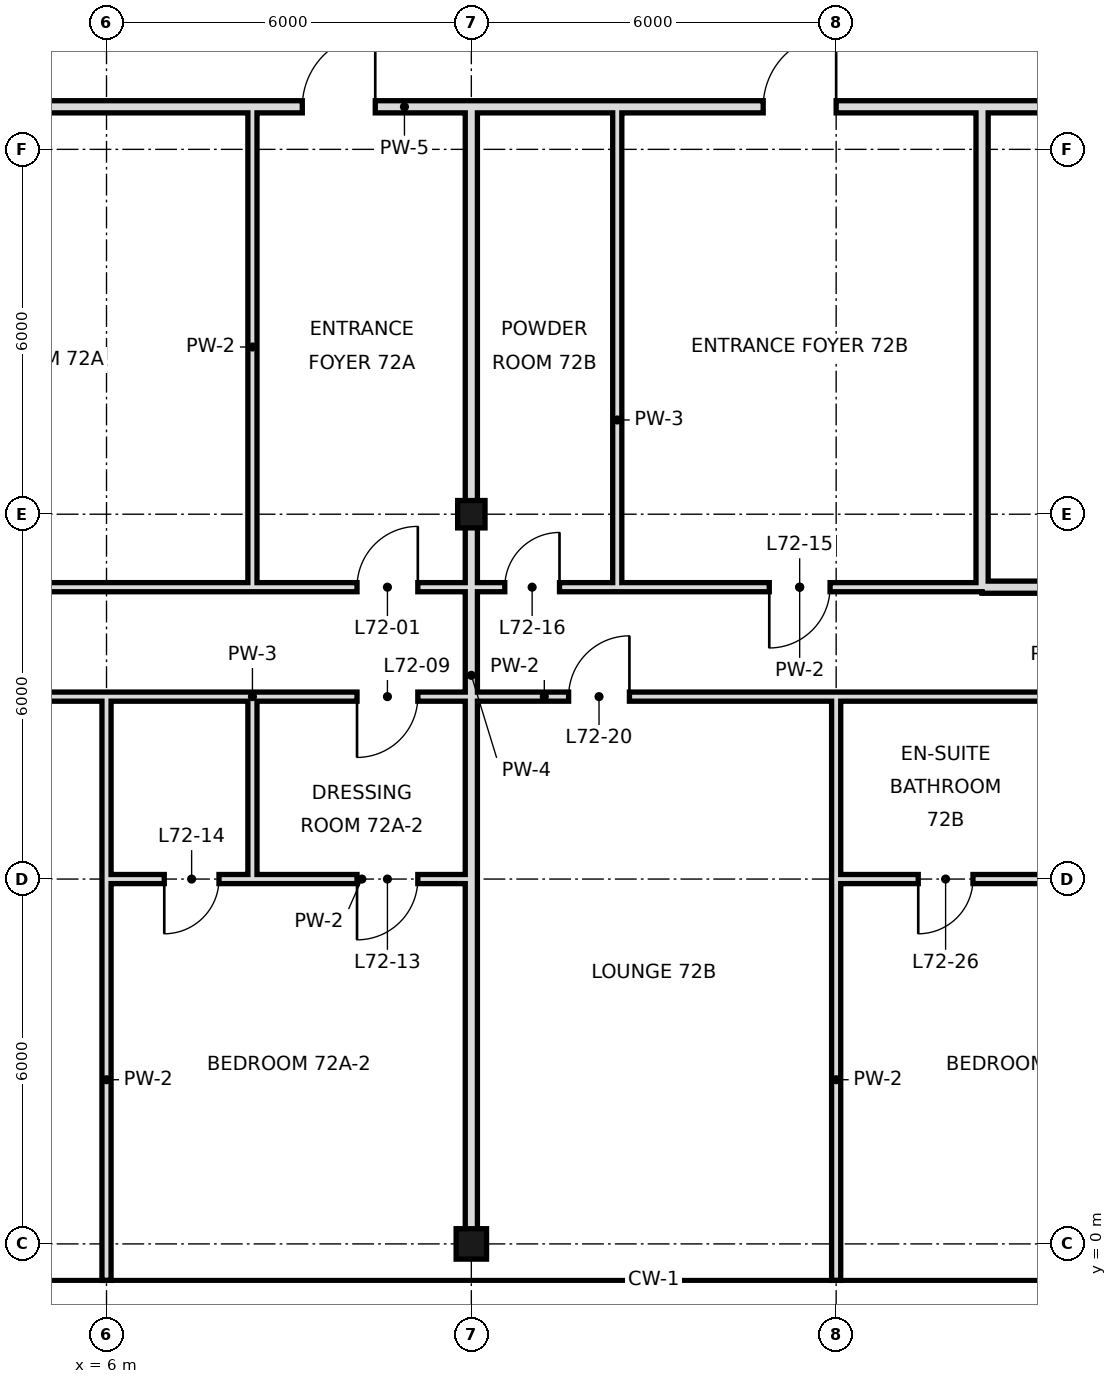
"""IFC4 building model, lengths in metres.
Left out: names, types, materials, properties, quantities, classifications, styles, units other than length and angle.
Written with IfcOpenShell. Run it as: python <this file> out.ifc"""

import sys

from ifc_helpers import new_model, si_unit, direction, frame, frame_2d, origin, origin_2d, place, context, subcontext, project, spatial, rectangle, hollow_rectangle, extrude, element, fill, save


model = new_model("IFC4")
c1 = context("Model", 3, precision=1e-05, world=origin(), true_north=direction((0.0, 1.0)))
c2 = subcontext(c1, "Body", "Model", "MODEL_VIEW")
j1 = project(units=[si_unit("LENGTHUNIT", "METRE"), si_unit("PLANEANGLEUNIT", "RADIAN")], contexts=[c1])
p1 = place(None, origin())
s1 = spatial("IfcSite", under=j1, at=p1, CompositionType="ELEMENT")
p2 = place(p1, origin())
s2 = spatial("IfcBuilding", under=s1, at=p2, CompositionType="ELEMENT")
p3 = place(p2, frame((0.0, 0.0, 305.2)))
s3 = spatial("IfcBuildingStorey", under=s2, at=p3, CompositionType="ELEMENT", Elevation=305.2)
p4 = place(p3, frame((12.0, 0.0, 0.0), z_axis=(0.0, 0.0, 1.0), x_axis=(1.0, 0.0, 0.0)))
e1 = element("IfcColumn", 1, at=p4, inside=s3, PredefinedType="COLUMN", context=c2, shape_type="SweptSolid", body=[
    extrude(hollow_rectangle(XDim=0.5, YDim=0.5, WallThickness=0.025, at=origin_2d()), origin(), (0.0, 0.0, 1.0), 3.6),
])
p5 = place(p3, frame((12.0, 12.0, 0.0), z_axis=(0.0, 0.0, 1.0), x_axis=(1.0, 0.0, 0.0)))
e2 = element("IfcColumn", 2, at=p5, inside=s3, PredefinedType="COLUMN", context=c2, shape_type="SweptSolid", body=[
    extrude(hollow_rectangle(XDim=0.45, YDim=0.45, WallThickness=0.022, at=origin_2d()), origin(), (0.0, 0.0, 1.0), 3.6),
])
p6 = place(p3, frame((12.0, 0.0, 0.0), z_axis=(0.0, 0.0, 1.0), x_axis=(0.0, 1.0, 0.0)))
e3 = element("IfcWall", 3, at=p6, inside=s3, PredefinedType="SOLIDWALL", context=c2, shape_type="SweptSolid", body=[
    extrude(rectangle(XDim=18.7, YDim=0.2, at=frame_2d((9.35, 0.0))), origin(), (0.0, 0.0, 1.0), 2.72),
])
p7 = place(p3, frame((14.4, 10.8, 0.0), z_axis=(0.0, 0.0, 1.0), x_axis=(0.0, 1.0, 0.0)))
e4 = element("IfcWall", 4, at=p7, inside=s3, PredefinedType="PARTITIONING", context=c2, shape_type="SweptSolid", body=[
    extrude(rectangle(XDim=7.9, YDim=0.15, at=frame_2d((3.95, 0.0))), origin(), (0.0, 0.0, 1.0), 3.42),
])
p8 = place(p3, frame((18.0, -0.6, 0.0), z_axis=(0.0, 0.0, 1.0), x_axis=(0.0, 1.0, 0.0)))
e5 = element("IfcWall", 5, at=p8, inside=s3, PredefinedType="PARTITIONING", context=c2, shape_type="SweptSolid", body=[
    extrude(rectangle(XDim=6.6, YDim=0.15, at=frame_2d((3.3, 0.0))), origin(), (0.0, 0.0, 1.0), 2.72),
])
p9 = place(p3, frame((18.0, 6.0, 0.0), z_axis=(0.0, 0.0, 1.0), x_axis=(0.0, 1.0, 0.0)))
e6 = element("IfcWall", 6, at=p9, inside=s3, PredefinedType="PARTITIONING", context=c2, shape_type="SweptSolid", body=[
    extrude(rectangle(XDim=3.0, YDim=0.15, at=frame_2d((1.5, 0.0))), origin(), (0.0, 0.0, 1.0), 2.72),
])
p10 = place(p3, frame((20.4, 10.8, 0.0), z_axis=(0.0, 0.0, 1.0), x_axis=(0.0, 1.0, 0.0)))
e7 = element("IfcWall", 7, at=p10, inside=s3, PredefinedType="SOLIDWALL", context=c2, shape_type="SweptSolid", body=[
    extrude(rectangle(XDim=7.9, YDim=0.2, at=frame_2d((3.95, 0.0))), origin(), (0.0, 0.0, 1.0), 2.72),
])
p11 = place(p3, frame((6.0, -0.6, 0.0), z_axis=(0.0, 0.0, 1.0), x_axis=(0.0, 1.0, 0.0)))
e8 = element("IfcWall", 8, at=p11, inside=s3, PredefinedType="PARTITIONING", context=c2, shape_type="SweptSolid", body=[
    extrude(rectangle(XDim=6.6, YDim=0.15, at=frame_2d((3.3, 0.0))), origin(), (0.0, 0.0, 1.0), 2.72),
])
p12 = place(p3, frame((6.0, 6.0, 0.0), z_axis=(0.0, 0.0, 1.0), x_axis=(0.0, 1.0, 0.0)))
e9 = element("IfcWall", 9, at=p12, inside=s3, PredefinedType="PARTITIONING", context=c2, shape_type="SweptSolid", body=[
    extrude(rectangle(XDim=3.0, YDim=0.15, at=frame_2d((1.5, 0.0))), origin(), (0.0, 0.0, 1.0), 2.72),
])
p13 = place(p3, frame((8.4, 10.8, 0.0), z_axis=(0.0, 0.0, 1.0), x_axis=(0.0, 1.0, 0.0)))
e10 = element("IfcWall", 10, at=p13, inside=s3, PredefinedType="PARTITIONING", context=c2, shape_type="SweptSolid", body=[
    extrude(rectangle(XDim=7.9, YDim=0.15, at=frame_2d((3.95, 0.0))), origin(), (0.0, 0.0, 1.0), 3.42),
])
p14 = place(p3, frame((8.4, 6.0, 0.0), z_axis=(0.0, 0.0, 1.0), x_axis=(0.0, 1.0, 0.0)))
e11 = element("IfcWall", 11, at=p14, inside=s3, PredefinedType="PARTITIONING", context=c2, shape_type="SweptSolid", body=[
    extrude(rectangle(XDim=3.0, YDim=0.15, at=frame_2d((1.5, 0.0))), origin(), (0.0, 0.0, 1.0), 3.42),
])
p15 = place(p3, frame((20.4, 10.8, 0.0), z_axis=(0.0, 0.0, 1.0), x_axis=(1.0, 0.0, 0.0)))
e12 = element("IfcWall", 12, at=p15, inside=s3, PredefinedType="SOLIDWALL", context=c2, shape_type="SweptSolid", body=[
    extrude(rectangle(XDim=4.2, YDim=0.2, at=frame_2d((2.1, 0.0))), origin(), (0.0, 0.0, 1.0), 2.72),
])
p16 = place(p15, frame((2.14, 0.0, 0.0)))
e13 = element("IfcOpeningElement", 13, at=p16, cuts=e12, PredefinedType="OPENING", context=c2, shape_type="SweptSolid", body=[
    extrude(rectangle(XDim=1.0, YDim=2.4, at=frame_2d((0.5, 1.2))), frame((0.0, 0.11, 0.0), z_axis=(0.0, -1.0, 0.0), x_axis=(1.0, 0.0, 0.0)), (0.0, 0.0, 1.0), 0.22),
])
p17 = place(p3, frame((-10.2, 10.8, 0.0), z_axis=(0.0, 0.0, 1.0), x_axis=(1.0, 0.0, 0.0)))
e14 = element("IfcWall", 14, at=p17, inside=s3, PredefinedType="PARTITIONING", context=c2, shape_type="SweptSolid", body=[
    extrude(rectangle(XDim=22.2, YDim=0.15, at=frame_2d((11.1, 0.0))), origin(), (0.0, 0.0, 1.0), 3.42),
])
p18 = place(p17, frame((20.32, 0.0, 0.0)))
e15 = element("IfcOpeningElement", 15, at=p18, cuts=e14, PredefinedType="OPENING", context=c2, shape_type="SweptSolid", body=[
    extrude(rectangle(XDim=1.0, YDim=2.4, at=frame_2d((0.5, 1.2))), frame((0.0, 0.085, 0.0), z_axis=(0.0, -1.0, 0.0), x_axis=(1.0, 0.0, 0.0)), (0.0, 0.0, 1.0), 0.17),
])
p19 = place(p17, frame((3.4, 0.0, 0.0)))
e16 = element("IfcOpeningElement", 16, at=p19, cuts=e14, PredefinedType="OPENING", context=c2, shape_type="SweptSolid", body=[
    extrude(rectangle(XDim=1.0, YDim=2.4, at=frame_2d((0.5, 1.2))), frame((0.0, 0.085, 0.0), z_axis=(0.0, -1.0, 0.0), x_axis=(1.0, 0.0, 0.0)), (0.0, 0.0, 1.0), 0.17),
])
p20 = place(p17, frame((10.84, 0.0, 0.0)))
e17 = element("IfcOpeningElement", 17, at=p20, cuts=e14, PredefinedType="OPENING", context=c2, shape_type="SweptSolid", body=[
    extrude(rectangle(XDim=1.0, YDim=2.4, at=frame_2d((0.5, 1.2))), frame((0.0, 0.085, 0.0), z_axis=(0.0, -1.0, 0.0), x_axis=(1.0, 0.0, 0.0)), (0.0, 0.0, 1.0), 0.17),
])
p21 = place(p3, frame((14.4, 10.8, 0.0), z_axis=(0.0, 0.0, 1.0), x_axis=(1.0, 0.0, 0.0)))
e18 = element("IfcWall", 18, at=p21, inside=s3, PredefinedType="PARTITIONING", context=c2, shape_type="SweptSolid", body=[
    extrude(rectangle(XDim=6.0, YDim=0.15, at=frame_2d((3.0, 0.0))), origin(), (0.0, 0.0, 1.0), 3.42),
])
p22 = place(p21, frame((2.5, 0.0, 0.0)))
e19 = element("IfcOpeningElement", 19, at=p22, cuts=e18, PredefinedType="OPENING", context=c2, shape_type="SweptSolid", body=[
    extrude(rectangle(XDim=1.0, YDim=2.4, at=frame_2d((0.5, 1.2))), frame((0.0, 0.085, 0.0), z_axis=(0.0, -1.0, 0.0), x_axis=(1.0, 0.0, 0.0)), (0.0, 0.0, 1.0), 0.17),
])
p23 = place(p3, frame((12.0, 10.8, 0.0), z_axis=(0.0, 0.0, 1.0), x_axis=(1.0, 0.0, 0.0)))
e20 = element("IfcWall", 20, at=p23, inside=s3, PredefinedType="PARTITIONING", context=c2, shape_type="SweptSolid", body=[
    extrude(rectangle(XDim=2.4, YDim=0.15, at=frame_2d((1.2, 0.0))), origin(), (0.0, 0.0, 1.0), 3.42),
])
p24 = place(p23, frame((0.55, 0.0, 0.0)))
e21 = element("IfcOpeningElement", 21, at=p24, cuts=e20, PredefinedType="OPENING", context=c2, shape_type="SweptSolid", body=[
    extrude(rectangle(XDim=0.9, YDim=2.4, at=frame_2d((0.45, 1.2))), frame((0.0, 0.085, 0.0), z_axis=(0.0, -1.0, 0.0), x_axis=(1.0, 0.0, 0.0)), (0.0, 0.0, 1.0), 0.17),
])
p25 = place(p3, frame((3.1, 18.7, 0.0), z_axis=(0.0, 0.0, 1.0), x_axis=(1.0, 0.0, 0.0)))
e22 = element("IfcWall", 22, at=p25, inside=s3, PredefinedType="SOLIDWALL", context=c2, shape_type="SweptSolid", body=[
    extrude(rectangle(XDim=17.3, YDim=0.2, at=frame_2d((8.65, 0.0))), origin(), (0.0, 0.0, 1.0), 2.72),
])
p26 = place(p25, frame((6.12, 0.0, 0.0)))
e23 = element("IfcOpeningElement", 23, at=p26, cuts=e22, PredefinedType="OPENING", context=c2, shape_type="SweptSolid", body=[
    extrude(rectangle(XDim=1.2, YDim=2.4, at=frame_2d((0.6, 1.2))), frame((0.0, 0.11, 0.0), z_axis=(0.0, -1.0, 0.0), x_axis=(1.0, 0.0, 0.0)), (0.0, 0.0, 1.0), 0.22),
])
p27 = place(p25, frame((13.7, 0.0, 0.0)))
e24 = element("IfcOpeningElement", 24, at=p27, cuts=e22, PredefinedType="OPENING", context=c2, shape_type="SweptSolid", body=[
    extrude(rectangle(XDim=1.2, YDim=2.4, at=frame_2d((0.6, 1.2))), frame((0.0, 0.11, 0.0), z_axis=(0.0, -1.0, 0.0), x_axis=(1.0, 0.0, 0.0)), (0.0, 0.0, 1.0), 0.22),
])
p28 = place(p3, frame((20.4, 18.7, 0.0), z_axis=(0.0, 0.0, 1.0), x_axis=(1.0, 0.0, 0.0)))
e25 = element("IfcWall", 25, at=p28, inside=s3, PredefinedType="SOLIDWALL", context=c2, shape_type="SweptSolid", body=[
    extrude(rectangle(XDim=4.2, YDim=0.2, at=frame_2d((2.1, 0.0))), origin(), (0.0, 0.0, 1.0), 3.42),
])
p29 = place(p3, frame((8.4, 6.0, 0.0), z_axis=(0.0, 0.0, 1.0), x_axis=(1.0, 0.0, 0.0)))
e26 = element("IfcWall", 26, at=p29, inside=s3, PredefinedType="PARTITIONING", context=c2, shape_type="SweptSolid", body=[
    extrude(rectangle(XDim=3.6, YDim=0.15, at=frame_2d((1.8, 0.0))), origin(), (0.0, 0.0, 1.0), 2.97),
])
p30 = place(p29, frame((1.72, 0.0, 0.0)))
e27 = element("IfcOpeningElement", 27, at=p30, cuts=e26, PredefinedType="OPENING", context=c2, shape_type="SweptSolid", body=[
    extrude(rectangle(XDim=1.0, YDim=2.4, at=frame_2d((0.5, 1.2))), frame((0.0, 0.085, 0.0), z_axis=(0.0, -1.0, 0.0), x_axis=(1.0, 0.0, 0.0)), (0.0, 0.0, 1.0), 0.17),
])
p31 = place(p3, frame((6.0, 6.0, 0.0), z_axis=(0.0, 0.0, 1.0), x_axis=(1.0, 0.0, 0.0)))
e28 = element("IfcWall", 28, at=p31, inside=s3, PredefinedType="PARTITIONING", context=c2, shape_type="SweptSolid", body=[
    extrude(rectangle(XDim=2.4, YDim=0.15, at=frame_2d((1.2, 0.0))), origin(), (0.0, 0.0, 1.0), 2.97),
])
p32 = place(p31, frame((0.95, 0.0, 0.0)))
e29 = element("IfcOpeningElement", 29, at=p32, cuts=e28, PredefinedType="OPENING", context=c2, shape_type="SweptSolid", body=[
    extrude(rectangle(XDim=0.9, YDim=2.4, at=frame_2d((0.45, 1.2))), frame((0.0, 0.085, 0.0), z_axis=(0.0, -1.0, 0.0), x_axis=(1.0, 0.0, 0.0)), (0.0, 0.0, 1.0), 0.17),
])
p33 = place(p3, frame((18.0, 6.0, 0.0), z_axis=(0.0, 0.0, 1.0), x_axis=(1.0, 0.0, 0.0)))
e30 = element("IfcWall", 30, at=p33, inside=s3, PredefinedType="PARTITIONING", context=c2, shape_type="SweptSolid", body=[
    extrude(rectangle(XDim=3.6, YDim=0.15, at=frame_2d((1.8, 0.0))), origin(), (0.0, 0.0, 1.0), 2.97),
])
p34 = place(p33, frame((1.35, 0.0, 0.0)))
e31 = element("IfcOpeningElement", 31, at=p34, cuts=e30, PredefinedType="OPENING", context=c2, shape_type="SweptSolid", body=[
    extrude(rectangle(XDim=0.9, YDim=2.4, at=frame_2d((0.45, 1.2))), frame((0.0, 0.085, 0.0), z_axis=(0.0, -1.0, 0.0), x_axis=(1.0, 0.0, 0.0)), (0.0, 0.0, 1.0), 0.17),
])
p35 = place(p3, frame((0.0, 9.0, 0.0), z_axis=(0.0, 0.0, 1.0), x_axis=(1.0, 0.0, 0.0)))
e32 = element("IfcWall", 32, at=p35, inside=s3, PredefinedType="PARTITIONING", context=c2, shape_type="SweptSolid", body=[
    extrude(rectangle(XDim=6.0, YDim=0.15, at=frame_2d((3.0, 0.0))), origin(), (0.0, 0.0, 1.0), 3.42),
])
p36 = place(p35, frame((2.5, 0.0, 0.0)))
e33 = element("IfcOpeningElement", 33, at=p36, cuts=e32, PredefinedType="OPENING", context=c2, shape_type="SweptSolid", body=[
    extrude(rectangle(XDim=1.0, YDim=2.4, at=frame_2d((0.5, 1.2))), frame((0.0, 0.085, 0.0), z_axis=(0.0, -1.0, 0.0), x_axis=(1.0, 0.0, 0.0)), (0.0, 0.0, 1.0), 0.17),
])
p37 = place(p3, frame((8.4, 9.0, 0.0), z_axis=(0.0, 0.0, 1.0), x_axis=(1.0, 0.0, 0.0)))
e34 = element("IfcWall", 34, at=p37, inside=s3, PredefinedType="PARTITIONING", context=c2, shape_type="SweptSolid", body=[
    extrude(rectangle(XDim=9.6, YDim=0.15, at=frame_2d((4.8, 0.0))), origin(), (0.0, 0.0, 1.0), 3.42),
])
p38 = place(p37, frame((1.72, 0.0, 0.0)))
e35 = element("IfcOpeningElement", 35, at=p38, cuts=e34, PredefinedType="OPENING", context=c2, shape_type="SweptSolid", body=[
    extrude(rectangle(XDim=1.0, YDim=2.4, at=frame_2d((0.5, 1.2))), frame((0.0, 0.085, 0.0), z_axis=(0.0, -1.0, 0.0), x_axis=(1.0, 0.0, 0.0)), (0.0, 0.0, 1.0), 0.17),
])
p39 = place(p37, frame((5.2, 0.0, 0.0)))
e36 = element("IfcOpeningElement", 36, at=p39, cuts=e34, PredefinedType="OPENING", context=c2, shape_type="SweptSolid", body=[
    extrude(rectangle(XDim=1.0, YDim=2.4, at=frame_2d((0.5, 1.2))), frame((0.0, 0.085, 0.0), z_axis=(0.0, -1.0, 0.0), x_axis=(1.0, 0.0, 0.0)), (0.0, 0.0, 1.0), 0.17),
])
p40 = place(p3, frame((6.0, 9.0, 0.0), z_axis=(0.0, 0.0, 1.0), x_axis=(1.0, 0.0, 0.0)))
e37 = element("IfcWall", 37, at=p40, inside=s3, PredefinedType="PARTITIONING", context=c2, shape_type="SweptSolid", body=[
    extrude(rectangle(XDim=2.4, YDim=0.15, at=frame_2d((1.2, 0.0))), origin(), (0.0, 0.0, 1.0), 3.42),
])
p41 = place(p3, frame((18.0, 9.0, 0.0), z_axis=(0.0, 0.0, 1.0), x_axis=(1.0, 0.0, 0.0)))
e38 = element("IfcWall", 38, at=p41, inside=s3, PredefinedType="PARTITIONING", context=c2, shape_type="SweptSolid", body=[
    extrude(rectangle(XDim=3.6, YDim=0.15, at=frame_2d((1.8, 0.0))), origin(), (0.0, 0.0, 1.0), 3.42),
])
p42 = place(p18, frame((1.0, 0.0, 0.0), z_axis=(0.0, 0.0, 1.0), x_axis=(-1.0, 0.0, 0.0)))
e39 = element("IfcDoor", 39, at=p42, inside=s3, OperationType="SINGLE_SWING_LEFT", PredefinedType="DOOR", context=c2, shape_type="SweptSolid", body=[
    extrude(rectangle(XDim=1.0, YDim=2.4, at=frame_2d((0.5, 1.2))), frame((0.0, 0.025, 0.0), z_axis=(0.0, -1.0, 0.0), x_axis=(1.0, 0.0, 0.0)), (0.0, 0.0, 1.0), 0.05),
])
fill(e15, e39)
p43 = place(p38, frame((1.0, 0.0, 0.0), z_axis=(0.0, 0.0, 1.0), x_axis=(-1.0, 0.0, 0.0)))
e40 = element("IfcDoor", 40, at=p43, inside=s3, OperationType="SINGLE_SWING_RIGHT", PredefinedType="DOOR", context=c2, shape_type="SweptSolid", body=[
    extrude(rectangle(XDim=1.0, YDim=2.4, at=frame_2d((0.5, 1.2))), frame((0.0, 0.025, 0.0), z_axis=(0.0, -1.0, 0.0), x_axis=(1.0, 0.0, 0.0)), (0.0, 0.0, 1.0), 0.05),
])
fill(e35, e40)
p44 = place(p30, frame((1.0, 0.0, 0.0), z_axis=(0.0, 0.0, 1.0), x_axis=(-1.0, 0.0, 0.0)))
e41 = element("IfcDoor", 41, at=p44, inside=s3, OperationType="SINGLE_SWING_RIGHT", PredefinedType="DOOR", context=c2, shape_type="SweptSolid", body=[
    extrude(rectangle(XDim=1.0, YDim=2.4, at=frame_2d((0.5, 1.2))), frame((0.0, 0.025, 0.0), z_axis=(0.0, -1.0, 0.0), x_axis=(1.0, 0.0, 0.0)), (0.0, 0.0, 1.0), 0.05),
])
fill(e27, e41)
p45 = place(p32, frame((0.9, 0.0, 0.0), z_axis=(0.0, 0.0, 1.0), x_axis=(-1.0, 0.0, 0.0)))
e42 = element("IfcDoor", 42, at=p45, inside=s3, OperationType="SINGLE_SWING_RIGHT", PredefinedType="DOOR", context=c2, shape_type="SweptSolid", body=[
    extrude(rectangle(XDim=0.9, YDim=2.4, at=frame_2d((0.45, 1.2))), frame((0.0, 0.025, 0.0), z_axis=(0.0, -1.0, 0.0), x_axis=(1.0, 0.0, 0.0)), (0.0, 0.0, 1.0), 0.05),
])
fill(e29, e42)
p46 = place(p22, frame((1.0, 0.0, 0.0), z_axis=(0.0, 0.0, 1.0), x_axis=(-1.0, 0.0, 0.0)))
e43 = element("IfcDoor", 43, at=p46, inside=s3, OperationType="SINGLE_SWING_RIGHT", PredefinedType="DOOR", context=c2, shape_type="SweptSolid", body=[
    extrude(rectangle(XDim=1.0, YDim=2.4, at=frame_2d((0.5, 1.2))), frame((0.0, 0.025, 0.0), z_axis=(0.0, -1.0, 0.0), x_axis=(1.0, 0.0, 0.0)), (0.0, 0.0, 1.0), 0.05),
])
fill(e19, e43)
p47 = place(p24, frame((0.9, 0.0, 0.0), z_axis=(0.0, 0.0, 1.0), x_axis=(-1.0, 0.0, 0.0)))
e44 = element("IfcDoor", 44, at=p47, inside=s3, OperationType="SINGLE_SWING_LEFT", PredefinedType="DOOR", context=c2, shape_type="SweptSolid", body=[
    extrude(rectangle(XDim=0.9, YDim=2.4, at=frame_2d((0.45, 1.2))), frame((0.0, 0.025, 0.0), z_axis=(0.0, -1.0, 0.0), x_axis=(1.0, 0.0, 0.0)), (0.0, 0.0, 1.0), 0.05),
])
fill(e21, e44)
p48 = place(p39, frame((1.0, 0.0, 0.0), z_axis=(0.0, 0.0, 1.0), x_axis=(-1.0, 0.0, 0.0)))
e45 = element("IfcDoor", 45, at=p48, inside=s3, OperationType="SINGLE_SWING_LEFT", PredefinedType="DOOR", context=c2, shape_type="SweptSolid", body=[
    extrude(rectangle(XDim=1.0, YDim=2.4, at=frame_2d((0.5, 1.2))), frame((0.0, 0.025, 0.0), z_axis=(0.0, -1.0, 0.0), x_axis=(1.0, 0.0, 0.0)), (0.0, 0.0, 1.0), 0.05),
])
fill(e36, e45)
p49 = place(p34, frame((0.9, 0.0, 0.0), z_axis=(0.0, 0.0, 1.0), x_axis=(-1.0, 0.0, 0.0)))
e46 = element("IfcDoor", 46, at=p49, inside=s3, OperationType="SINGLE_SWING_RIGHT", PredefinedType="DOOR", context=c2, shape_type="SweptSolid", body=[
    extrude(rectangle(XDim=0.9, YDim=2.4, at=frame_2d((0.45, 1.2))), frame((0.0, 0.025, 0.0), z_axis=(0.0, -1.0, 0.0), x_axis=(1.0, 0.0, 0.0)), (0.0, 0.0, 1.0), 0.05),
])
fill(e31, e46)
p50 = place(p26, frame((1.2, 0.0, 0.0), z_axis=(0.0, 0.0, 1.0), x_axis=(-1.0, 0.0, 0.0)))
e47 = element("IfcDoor", 47, at=p50, inside=s3, OperationType="SINGLE_SWING_LEFT", PredefinedType="DOOR", context=c2, shape_type="SweptSolid", body=[
    extrude(rectangle(XDim=1.2, YDim=2.4, at=frame_2d((0.6, 1.2))), frame((0.0, 0.025, 0.0), z_axis=(0.0, -1.0, 0.0), x_axis=(1.0, 0.0, 0.0)), (0.0, 0.0, 1.0), 0.05),
])
fill(e23, e47)
p51 = place(p27, frame((1.2, 0.0, 0.0), z_axis=(0.0, 0.0, 1.0), x_axis=(-1.0, 0.0, 0.0)))
e48 = element("IfcDoor", 48, at=p51, inside=s3, OperationType="SINGLE_SWING_LEFT", PredefinedType="DOOR", context=c2, shape_type="SweptSolid", body=[
    extrude(rectangle(XDim=1.2, YDim=2.4, at=frame_2d((0.6, 1.2))), frame((0.0, 0.025, 0.0), z_axis=(0.0, -1.0, 0.0), x_axis=(1.0, 0.0, 0.0)), (0.0, 0.0, 1.0), 0.05),
])
fill(e24, e48)
save(model, sys.argv[1])
